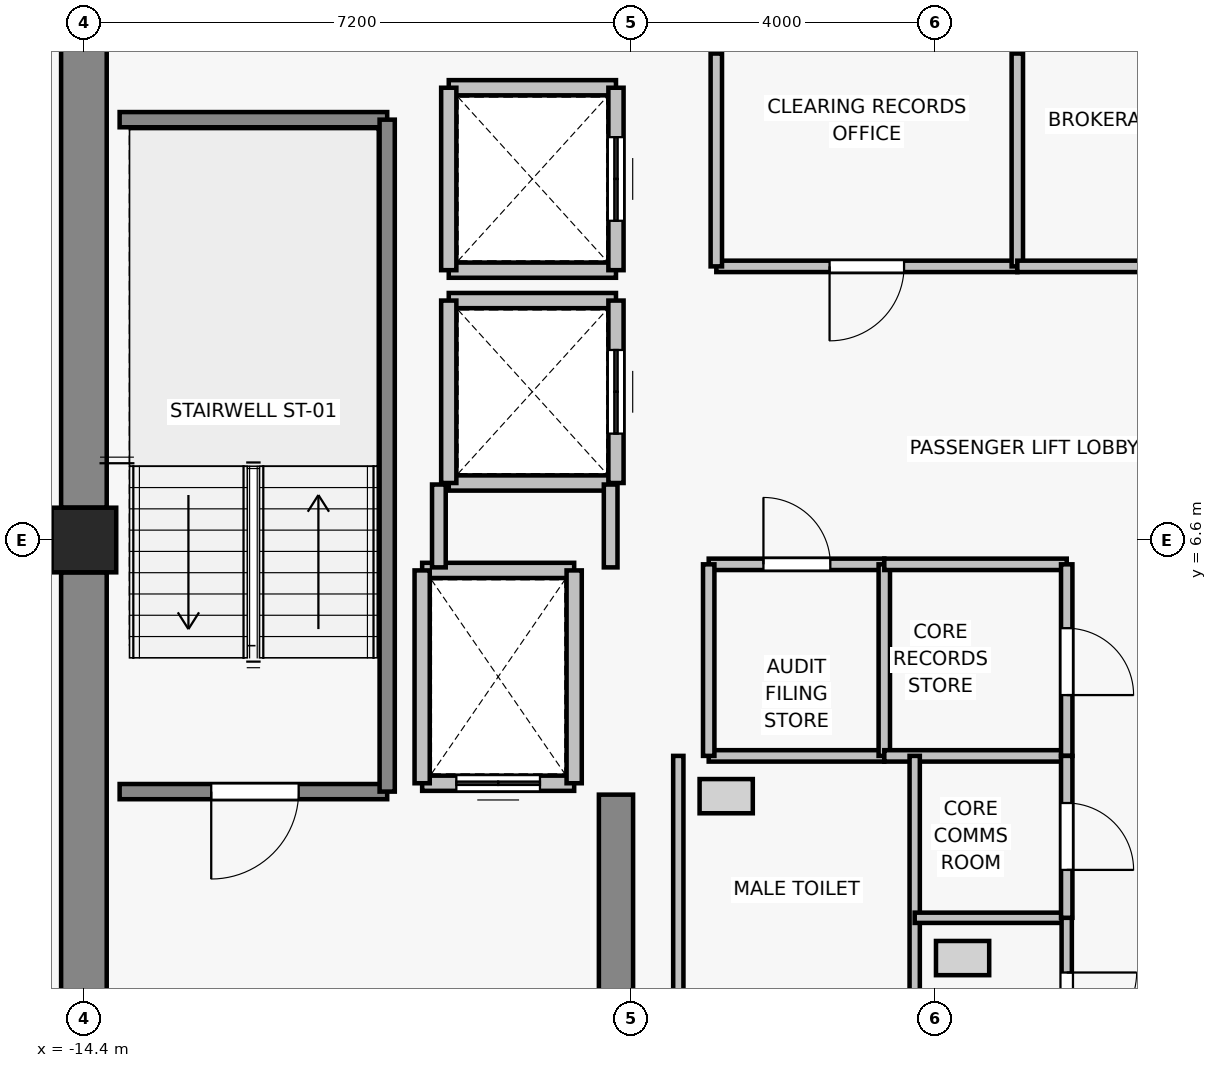
"""IFC4 building model, lengths in metres.
Left out: names, types, materials, properties, quantities, classifications, styles, units other than length and angle.
Written with IfcOpenShell. Run it as: python <this file> out.ifc"""

import sys

from ifc_helpers import new_model, si_unit, direction, frame, frame_2d, origin, origin_2d, place, context, subcontext, project, spatial, rectangle, extrude, source, transform, mapped, element, fill, save


model = new_model("IFC4")
c1 = context("Model", 3, precision=1e-05, world=origin(), true_north=direction((0.0, 1.0)))
c2 = subcontext(c1, "Body", "Model", "MODEL_VIEW")
j1 = project(units=[si_unit("LENGTHUNIT", "METRE"), si_unit("PLANEANGLEUNIT", "RADIAN")], contexts=[c1])
p1 = place(None, origin())
s1 = spatial("IfcSite", under=j1, at=p1, CompositionType="ELEMENT")
p2 = place(p1, origin())
s2 = spatial("IfcBuilding", under=s1, at=p2, CompositionType="ELEMENT")
p3 = place(p2, frame((0.0, 0.0, 261.7)))
s3 = spatial("IfcBuildingStorey", under=s2, at=p3, CompositionType="ELEMENT", Elevation=261.7)
p4 = place(p3, frame((-14.4, 6.6, 0.0), z_axis=(0.0, 0.0, 1.0), x_axis=(1.0, 0.0, 0.0)))
e1 = element("IfcColumn", 1, at=p4, inside=s3, PredefinedType="COLUMN", context=c2, shape_type="SweptSolid", body=[
    extrude(rectangle(XDim=0.85, YDim=0.85, at=origin_2d()), origin(), (0.0, 0.0, 1.0), 3.3),
])
p5 = place(p3, frame((-14.4, -0.775, 0.0), z_axis=(0.0, 0.0, 1.0), x_axis=(0.0, 1.0, 0.0)))
e2 = element("IfcWall", 2, at=p5, inside=s3, PredefinedType="SHEAR", context=c2, shape_type="SweptSolid", body=[
    extrude(rectangle(XDim=6.95, YDim=0.6, at=frame_2d((3.475, 0.0))), origin(), (0.0, 0.0, 1.0), 3.075),
])
p6 = place(p3, frame((-14.4, 7.025, 0.0), z_axis=(0.0, 0.0, 1.0), x_axis=(0.0, 1.0, 0.0)))
e3 = element("IfcWall", 3, at=p6, inside=s3, PredefinedType="SHEAR", context=c2, shape_type="SweptSolid", body=[
    extrude(rectangle(XDim=6.05, YDim=0.6, at=frame_2d((3.025, 0.0))), origin(), (0.0, 0.0, 1.0), 3.075),
])
p7 = place(p3, frame((-7.4, -0.9, 0.0), z_axis=(0.0, 0.0, 1.0), x_axis=(0.0, 1.0, 0.0)))
e4 = element("IfcWall", 4, at=p7, inside=s3, PredefinedType="SHEAR", context=c2, shape_type="SweptSolid", body=[
    extrude(rectangle(XDim=4.15, YDim=0.45, at=frame_2d((2.075, 0.0))), origin(), (0.0, 0.0, 1.0), 3.075),
])
p8 = place(p3, frame((-7.95, 3.4, 0.0), z_axis=(0.0, 0.0, 1.0), x_axis=(-1.0, 0.0, 0.0)))
e5 = element("IfcWall", 5, at=p8, inside=s3, PredefinedType="SOLIDWALL", context=c2, shape_type="SweptSolid", body=[
    extrude(rectangle(XDim=2.0, YDim=0.2, at=frame_2d((1.0, 0.0))), origin(), (0.0, 0.0, 1.0), 3.075),
])
p9 = place(p8, frame((0.45, 0.0, 0.0)))
e6 = element("IfcOpeningElement", 6, at=p9, cuts=e5, PredefinedType="OPENING", context=c2, shape_type="SweptSolid", body=[
    extrude(rectangle(XDim=1.1, YDim=2.2, at=frame_2d((0.55, 1.1))), frame((0.0, 0.11, 0.0), z_axis=(0.0, -1.0, 0.0), x_axis=(1.0, 0.0, 0.0)), (0.0, 0.0, 1.0), 0.22),
])
p10 = place(p3, frame((-9.95, 6.2, 0.0), z_axis=(0.0, 0.0, 1.0), x_axis=(1.0, 0.0, 0.0)))
e7 = element("IfcWall", 7, at=p10, inside=s3, PredefinedType="SOLIDWALL", context=c2, shape_type="SweptSolid", body=[
    extrude(rectangle(XDim=2.0, YDim=0.2, at=frame_2d((1.0, 0.0))), origin(), (0.0, 0.0, 1.0), 3.075),
])
for number, where, z_axis, x_axis in (
    (8, (-9.95, 3.4, 0.0), (0.0, 0.0, 1.0), (0.0, 1.0, 0.0)),
    (9, (-7.95, 6.2, 0.0), (0.0, 0.0, 1.0), (0.0, -1.0, 0.0)),
):
    element("IfcWall", number, at=place(p3, frame(where, z_axis=z_axis, x_axis=x_axis)), inside=s3, PredefinedType="SOLIDWALL", context=c2, shape_type="SweptSolid", body=[
        extrude(rectangle(XDim=2.8, YDim=0.2, at=frame_2d((1.4, 0.0))), origin(), (0.0, 0.0, 1.0), 3.075),
    ])
for number, where, z_axis, x_axis in (
    (10, (-7.4, 7.35, 0.0), (0.0, 0.0, 1.0), (-1.0, 0.0, 0.0)),
    (11, (-9.6, 9.75, 0.0), (0.0, 0.0, 1.0), (1.0, 0.0, 0.0)),
):
    element("IfcWall", number, at=place(p3, frame(where, z_axis=z_axis, x_axis=x_axis)), inside=s3, PredefinedType="SOLIDWALL", context=c2, shape_type="SweptSolid", body=[
        extrude(rectangle(XDim=2.2, YDim=0.2, at=frame_2d((1.1, 0.0))), origin(), (0.0, 0.0, 1.0), 2.615),
    ])
p11 = place(p3, frame((-9.6, 7.35, 0.0), z_axis=(0.0, 0.0, 1.0), x_axis=(0.0, 1.0, 0.0)))
e12 = element("IfcWall", 12, at=p11, inside=s3, PredefinedType="SOLIDWALL", context=c2, shape_type="SweptSolid", body=[
    extrude(rectangle(XDim=2.4, YDim=0.2, at=frame_2d((1.2, 0.0))), origin(), (0.0, 0.0, 1.0), 3.075),
])
p12 = place(p3, frame((-7.4, 9.75, 0.0), z_axis=(0.0, 0.0, 1.0), x_axis=(0.0, -1.0, 0.0)))
e13 = element("IfcWall", 13, at=p12, inside=s3, PredefinedType="SOLIDWALL", context=c2, shape_type="SweptSolid", body=[
    extrude(rectangle(XDim=2.4, YDim=0.2, at=frame_2d((1.2, 0.0))), origin(), (0.0, 0.0, 1.0), 2.615),
])
p13 = place(p12, frame((0.65, 0.0, 0.0)))
e14 = element("IfcOpeningElement", 14, at=p13, cuts=e13, PredefinedType="OPENING", context=c2, shape_type="SweptSolid", body=[
    extrude(rectangle(XDim=1.1, YDim=2.2, at=frame_2d((0.55, 1.1))), frame((0.0, 0.11, 0.0), z_axis=(0.0, -1.0, 0.0), x_axis=(1.0, 0.0, 0.0)), (0.0, 0.0, 1.0), 0.22),
])
for number, where, z_axis, x_axis in (
    (15, (-7.4, 10.15, 0.0), (0.0, 0.0, 1.0), (-1.0, 0.0, 0.0)),
    (16, (-9.6, 12.55, 0.0), (0.0, 0.0, 1.0), (1.0, 0.0, 0.0)),
):
    element("IfcWall", number, at=place(p3, frame(where, z_axis=z_axis, x_axis=x_axis)), inside=s3, PredefinedType="SOLIDWALL", context=c2, shape_type="SweptSolid", body=[
        extrude(rectangle(XDim=2.2, YDim=0.2, at=frame_2d((1.1, 0.0))), origin(), (0.0, 0.0, 1.0), 2.615),
    ])
p14 = place(p3, frame((-9.6, 10.15, 0.0), z_axis=(0.0, 0.0, 1.0), x_axis=(0.0, 1.0, 0.0)))
e17 = element("IfcWall", 17, at=p14, inside=s3, PredefinedType="SOLIDWALL", context=c2, shape_type="SweptSolid", body=[
    extrude(rectangle(XDim=2.4, YDim=0.2, at=frame_2d((1.2, 0.0))), origin(), (0.0, 0.0, 1.0), 3.075),
])
p15 = place(p3, frame((-7.4, 12.55, 0.0), z_axis=(0.0, 0.0, 1.0), x_axis=(0.0, -1.0, 0.0)))
e18 = element("IfcWall", 18, at=p15, inside=s3, PredefinedType="SOLIDWALL", context=c2, shape_type="SweptSolid", body=[
    extrude(rectangle(XDim=2.4, YDim=0.2, at=frame_2d((1.2, 0.0))), origin(), (0.0, 0.0, 1.0), 2.615),
])
p16 = place(p15, frame((0.65, 0.0, 0.0)))
e19 = element("IfcOpeningElement", 19, at=p16, cuts=e18, PredefinedType="OPENING", context=c2, shape_type="SweptSolid", body=[
    extrude(rectangle(XDim=1.1, YDim=2.2, at=frame_2d((0.55, 1.1))), frame((0.0, 0.11, 0.0), z_axis=(0.0, -1.0, 0.0), x_axis=(1.0, 0.0, 0.0)), (0.0, 0.0, 1.0), 0.22),
])
p17 = place(p3, frame((-10.41, 3.29, 0.0), z_axis=(0.0, 0.0, 1.0), x_axis=(-1.0, 0.0, 0.0)))
e20 = element("IfcWall", 20, at=p17, inside=s3, PredefinedType="SOLIDWALL", context=c2, shape_type="SweptSolid", body=[
    extrude(rectangle(XDim=3.52, YDim=0.2, at=frame_2d((1.76, 0.0))), origin(), (0.0, 0.0, 1.0), 3.075),
])
p18 = place(p17, frame((1.165, 0.0, 0.0)))
e21 = element("IfcOpeningElement", 21, at=p18, cuts=e20, PredefinedType="OPENING", context=c2, shape_type="SweptSolid", body=[
    extrude(rectangle(XDim=1.15, YDim=2.15, at=frame_2d((0.575, 1.075))), frame((0.0, 0.11, 0.0), z_axis=(0.0, -1.0, 0.0), x_axis=(1.0, 0.0, 0.0)), (0.0, 0.0, 1.0), 0.22),
])
p19 = place(p3, frame((-13.93, 12.13, 0.0), z_axis=(0.0, 0.0, 1.0), x_axis=(1.0, 0.0, 0.0)))
e22 = element("IfcWall", 22, at=p19, inside=s3, PredefinedType="SOLIDWALL", context=c2, shape_type="SweptSolid", body=[
    extrude(rectangle(XDim=3.52, YDim=0.2, at=frame_2d((1.76, 0.0))), origin(), (0.0, 0.0, 1.0), 3.075),
])
p20 = place(p3, frame((-10.41, 12.13, 0.0), z_axis=(0.0, 0.0, 1.0), x_axis=(0.0, -1.0, 0.0)))
e23 = element("IfcWall", 23, at=p20, inside=s3, PredefinedType="SOLIDWALL", context=c2, shape_type="SweptSolid", body=[
    extrude(rectangle(XDim=8.84, YDim=0.2, at=frame_2d((4.42, 0.0))), origin(), (0.0, 0.0, 1.0), 3.075),
])
p21 = place(p3, frame((-9.73, 6.24, 0.0), z_axis=(0.0, 0.0, 1.0), x_axis=(0.0, 1.0, 0.0)))
e24 = element("IfcWall", 24, at=p21, inside=s3, PredefinedType="PARTITIONING", context=c2, shape_type="SweptSolid", body=[
    extrude(rectangle(XDim=1.09, YDim=0.18, at=frame_2d((0.545, 0.0))), origin(), (0.0, 0.0, 1.0), 3.075),
])
p22 = place(p3, frame((-7.47, 7.33, 0.0), z_axis=(0.0, 0.0, 1.0), x_axis=(0.0, -1.0, 0.0)))
e25 = element("IfcWall", 25, at=p22, inside=s3, PredefinedType="PARTITIONING", context=c2, shape_type="SweptSolid", body=[
    extrude(rectangle(XDim=1.09, YDim=0.18, at=frame_2d((0.545, 0.0))), origin(), (0.0, 0.0, 1.0), 2.615),
])
p23 = place(p3, frame((-2.12, 10.2, 0.0), z_axis=(0.0, 0.0, 1.0), x_axis=(-1.0, 0.0, 0.0)))
e26 = element("IfcWall", 26, at=p23, inside=s3, PredefinedType="PARTITIONING", context=c2, shape_type="SweptSolid", body=[
    extrude(rectangle(XDim=3.96, YDim=0.15, at=frame_2d((1.98, 0.0))), origin(), (0.0, 0.0, 1.0), 3.075),
])
p24 = place(p23, frame((1.49, 0.0, 0.0)))
e27 = element("IfcOpeningElement", 27, at=p24, cuts=e26, PredefinedType="OPENING", context=c2, shape_type="SweptSolid", body=[
    extrude(rectangle(XDim=0.98, YDim=2.15, at=frame_2d((0.49, 1.075))), frame((0.0, 0.085, 0.0), z_axis=(0.0, -1.0, 0.0), x_axis=(1.0, 0.0, 0.0)), (0.0, 0.0, 1.0), 0.17),
])
for number, where, z_axis, x_axis in (
    (28, (-6.08, 10.2, 0.0), (0.0, 0.0, 1.0), (0.0, 1.0, 0.0)),
    (29, (-2.12, 13.0, 0.0), (0.0, 0.0, 1.0), (0.0, -1.0, 0.0)),
):
    element("IfcWall", number, at=place(p3, frame(where, z_axis=z_axis, x_axis=x_axis)), inside=s3, PredefinedType="PARTITIONING", context=c2, shape_type="SweptSolid", body=[
        extrude(rectangle(XDim=2.8, YDim=0.15, at=frame_2d((1.4, 0.0))), origin(), (0.0, 0.0, 1.0), 3.075),
    ])
p25 = place(p3, frame((2.04, 10.2, 0.0), z_axis=(0.0, 0.0, 1.0), x_axis=(-1.0, 0.0, 0.0)))
e30 = element("IfcWall", 30, at=p25, inside=s3, PredefinedType="PARTITIONING", context=c2, shape_type="SweptSolid", body=[
    extrude(rectangle(XDim=4.16, YDim=0.15, at=frame_2d((2.08, 0.0))), origin(), (0.0, 0.0, 1.0), 3.075),
])
p26 = place(p25, frame((1.55, 0.0, 0.0)))
e31 = element("IfcOpeningElement", 31, at=p26, cuts=e30, PredefinedType="OPENING", context=c2, shape_type="SweptSolid", body=[
    extrude(rectangle(XDim=0.98, YDim=2.15, at=frame_2d((0.49, 1.075))), frame((0.0, 0.085, 0.0), z_axis=(0.0, -1.0, 0.0), x_axis=(1.0, 0.0, 0.0)), (0.0, 0.0, 1.0), 0.17),
])
p27 = place(p3, frame((-3.87, 3.76, 0.0), z_axis=(0.0, 0.0, 1.0), x_axis=(-1.0, 0.0, 0.0)))
e32 = element("IfcWall", 32, at=p27, inside=s3, PredefinedType="PARTITIONING", context=c2, shape_type="SweptSolid", body=[
    extrude(rectangle(XDim=2.31, YDim=0.15, at=frame_2d((1.155, 0.0))), origin(), (0.0, 0.0, 1.0), 3.075),
])
p28 = place(p3, frame((-6.18, 6.28, 0.0), z_axis=(0.0, 0.0, 1.0), x_axis=(1.0, 0.0, 0.0)))
e33 = element("IfcWall", 33, at=p28, inside=s3, PredefinedType="PARTITIONING", context=c2, shape_type="SweptSolid", body=[
    extrude(rectangle(XDim=2.31, YDim=0.15, at=frame_2d((1.155, 0.0))), origin(), (0.0, 0.0, 1.0), 3.075),
])
p29 = place(p28, frame((0.72, 0.0, 0.0)))
e34 = element("IfcOpeningElement", 34, at=p29, cuts=e33, PredefinedType="OPENING", context=c2, shape_type="SweptSolid", body=[
    extrude(rectangle(XDim=0.88, YDim=2.1, at=frame_2d((0.44, 1.05))), frame((0.0, 0.085, 0.0), z_axis=(0.0, -1.0, 0.0), x_axis=(1.0, 0.0, 0.0)), (0.0, 0.0, 1.0), 0.17),
])
for number, where, z_axis, x_axis in (
    (35, (-6.18, 3.76, 0.0), (0.0, 0.0, 1.0), (0.0, 1.0, 0.0)),
    (36, (-3.87, 6.28, 0.0), (0.0, 0.0, 1.0), (0.0, -1.0, 0.0)),
):
    element("IfcWall", number, at=place(p3, frame(where, z_axis=z_axis, x_axis=x_axis)), inside=s3, PredefinedType="PARTITIONING", context=c2, shape_type="SweptSolid", body=[
        extrude(rectangle(XDim=2.52, YDim=0.15, at=frame_2d((1.26, 0.0))), origin(), (0.0, 0.0, 1.0), 3.075),
    ])
for number, where, z_axis, x_axis in (
    (37, (-1.47, 3.76, 0.0), (0.0, 0.0, 1.0), (-1.0, 0.0, 0.0)),
    (38, (-3.87, 6.28, 0.0), (0.0, 0.0, 1.0), (1.0, 0.0, 0.0)),
):
    element("IfcWall", number, at=place(p3, frame(where, z_axis=z_axis, x_axis=x_axis)), inside=s3, PredefinedType="PARTITIONING", context=c2, shape_type="SweptSolid", body=[
        extrude(rectangle(XDim=2.4, YDim=0.15, at=frame_2d((1.2, 0.0))), origin(), (0.0, 0.0, 1.0), 3.075),
    ])
p30 = place(p3, frame((-1.47, 6.28, 0.0), z_axis=(0.0, 0.0, 1.0), x_axis=(0.0, -1.0, 0.0)))
e39 = element("IfcWall", 39, at=p30, inside=s3, PredefinedType="PARTITIONING", context=c2, shape_type="SweptSolid", body=[
    extrude(rectangle(XDim=2.52, YDim=0.15, at=frame_2d((1.26, 0.0))), origin(), (0.0, 0.0, 1.0), 3.075),
])
p31 = place(p30, frame((0.84, 0.0, 0.0)))
e40 = element("IfcOpeningElement", 40, at=p31, cuts=e39, PredefinedType="OPENING", context=c2, shape_type="SweptSolid", body=[
    extrude(rectangle(XDim=0.88, YDim=2.1, at=frame_2d((0.44, 1.05))), frame((0.0, 0.085, 0.0), z_axis=(0.0, -1.0, 0.0), x_axis=(1.0, 0.0, 0.0)), (0.0, 0.0, 1.0), 0.17),
])
for number, where, z_axis, x_axis in (
    (41, (-6.58, -0.73, 0.0), (0.0, 0.0, 1.0), (0.0, 1.0, 0.0)),
    (42, (-3.47, 3.76, 0.0), (0.0, 0.0, 1.0), (0.0, -1.0, 0.0)),
):
    element("IfcWall", number, at=place(p3, frame(where, z_axis=z_axis, x_axis=x_axis)), inside=s3, PredefinedType="PARTITIONING", context=c2, shape_type="SweptSolid", body=[
        extrude(rectangle(XDim=4.49, YDim=0.135, at=frame_2d((2.245, 0.0))), origin(), (0.0, 0.0, 1.0), 3.075),
    ])
p32 = place(p3, frame((-3.47, 1.63, 0.0), z_axis=(0.0, 0.0, 1.0), x_axis=(1.0, 0.0, 0.0)))
e43 = element("IfcWall", 43, at=p32, inside=s3, PredefinedType="PARTITIONING", context=c2, shape_type="SweptSolid", body=[
    extrude(rectangle(XDim=2.0, YDim=0.135, at=frame_2d((1.0, 0.0))), origin(), (0.0, 0.0, 1.0), 3.075),
])
p33 = place(p3, frame((-1.47, 1.63, 0.0), z_axis=(0.0, 0.0, 1.0), x_axis=(0.0, -1.0, 0.0)))
e44 = element("IfcWall", 44, at=p33, inside=s3, PredefinedType="PARTITIONING", context=c2, shape_type="SweptSolid", body=[
    extrude(rectangle(XDim=2.36, YDim=0.135, at=frame_2d((1.18, 0.0))), origin(), (0.0, 0.0, 1.0), 3.075),
])
p34 = place(p33, frame((0.72, 0.0, 0.0)))
e45 = element("IfcOpeningElement", 45, at=p34, cuts=e44, PredefinedType="OPENING", context=c2, shape_type="SweptSolid", body=[
    extrude(rectangle(XDim=0.92, YDim=2.1, at=frame_2d((0.46, 1.05))), frame((0.0, 0.077, 0.0), z_axis=(0.0, -1.0, 0.0), x_axis=(1.0, 0.0, 0.0)), (0.0, 0.0, 1.0), 0.155),
])
p35 = place(p3, frame((-1.47, 3.76, 0.0), z_axis=(0.0, 0.0, 1.0), x_axis=(0.0, -1.0, 0.0)))
e46 = element("IfcWall", 46, at=p35, inside=s3, PredefinedType="PARTITIONING", context=c2, shape_type="SweptSolid", body=[
    extrude(rectangle(XDim=2.13, YDim=0.15, at=frame_2d((1.065, 0.0))), origin(), (0.0, 0.0, 1.0), 3.075),
])
p36 = place(p35, frame((0.62, 0.0, 0.0)))
e47 = element("IfcOpeningElement", 47, at=p36, cuts=e46, PredefinedType="OPENING", context=c2, shape_type="SweptSolid", body=[
    extrude(rectangle(XDim=0.88, YDim=2.1, at=frame_2d((0.44, 1.05))), frame((0.0, 0.085, 0.0), z_axis=(0.0, -1.0, 0.0), x_axis=(1.0, 0.0, 0.0)), (0.0, 0.0, 1.0), 0.17),
])
m1 = source(origin(), c2, "Body", "SweptSolid", [
    extrude(rectangle(XDim=1.1, YDim=2.2, at=frame_2d((0.55, 1.1))), frame((0.0, 0.025, 0.0), z_axis=(0.0, -1.0, 0.0), x_axis=(1.0, 0.0, 0.0)), (0.0, 0.0, 1.0), 0.05),
])
p37 = place(p9, origin())
e48 = element("IfcDoor", 48, at=p37, inside=s3, OperationType="DOUBLE_DOOR_SLIDING", PredefinedType="DOOR", context=c2, shape_type="MappedRepresentation", body=[
    mapped(m1, transform((0.0, 0.0, 0.0), x_axis=(1.0, 0.0, 0.0), y_axis=(0.0, 1.0, 0.0), z_axis=(0.0, 0.0, 1.0), scale=1.0)),
])
fill(e6, e48)
p38 = place(p13, origin())
e49 = element("IfcDoor", 49, at=p38, inside=s3, OperationType="DOUBLE_DOOR_SLIDING", PredefinedType="DOOR", context=c2, shape_type="MappedRepresentation", body=[
    mapped(m1, transform((0.0, 0.0, 0.0), x_axis=(1.0, 0.0, 0.0), y_axis=(0.0, 1.0, 0.0), z_axis=(0.0, 0.0, 1.0), scale=1.0)),
])
fill(e14, e49)
p39 = place(p16, origin())
e50 = element("IfcDoor", 50, at=p39, inside=s3, OperationType="DOUBLE_DOOR_SLIDING", PredefinedType="DOOR", context=c2, shape_type="MappedRepresentation", body=[
    mapped(m1, transform((0.0, 0.0, 0.0), x_axis=(1.0, 0.0, 0.0), y_axis=(0.0, 1.0, 0.0), z_axis=(0.0, 0.0, 1.0), scale=1.0)),
])
fill(e19, e50)
m2 = source(origin(), c2, "Body", "SweptSolid", [
    extrude(rectangle(XDim=1.15, YDim=2.15, at=frame_2d((0.575, 1.075))), frame((0.0, 0.025, 0.0), z_axis=(0.0, -1.0, 0.0), x_axis=(1.0, 0.0, 0.0)), (0.0, 0.0, 1.0), 0.05),
])
p40 = place(p18, origin())
e51 = element("IfcDoor", 51, at=p40, inside=s3, OperationType="SINGLE_SWING_RIGHT", PredefinedType="DOOR", context=c2, shape_type="MappedRepresentation", body=[
    mapped(m2, transform((0.0, 0.0, 0.0), x_axis=(1.0, 0.0, 0.0), y_axis=(0.0, 1.0, 0.0), z_axis=(0.0, 0.0, 1.0), scale=1.0)),
])
fill(e21, e51)
m3 = source(origin(), c2, "Body", "SweptSolid", [
    extrude(rectangle(XDim=0.98, YDim=2.15, at=frame_2d((0.49, 1.075))), frame((0.0, 0.025, 0.0), z_axis=(0.0, -1.0, 0.0), x_axis=(1.0, 0.0, 0.0)), (0.0, 0.0, 1.0), 0.05),
])
p41 = place(p24, origin())
e52 = element("IfcDoor", 52, at=p41, inside=s3, OperationType="SINGLE_SWING_RIGHT", PredefinedType="DOOR", context=c2, shape_type="MappedRepresentation", body=[
    mapped(m3, transform((0.0, 0.0, 0.0), x_axis=(1.0, 0.0, 0.0), y_axis=(0.0, 1.0, 0.0), z_axis=(0.0, 0.0, 1.0), scale=1.0)),
])
fill(e27, e52)
m4 = source(origin(), c2, "Body", "SweptSolid", [
    extrude(rectangle(XDim=0.88, YDim=2.1, at=frame_2d((0.44, 1.05))), frame((0.0, 0.025, 0.0), z_axis=(0.0, -1.0, 0.0), x_axis=(1.0, 0.0, 0.0)), (0.0, 0.0, 1.0), 0.05),
])
p42 = place(p29, origin())
e53 = element("IfcDoor", 53, at=p42, inside=s3, OperationType="SINGLE_SWING_LEFT", PredefinedType="DOOR", context=c2, shape_type="MappedRepresentation", body=[
    mapped(m4, transform((0.0, 0.0, 0.0), x_axis=(1.0, 0.0, 0.0), y_axis=(0.0, 1.0, 0.0), z_axis=(0.0, 0.0, 1.0), scale=1.0)),
])
fill(e34, e53)
p43 = place(p31, origin())
e54 = element("IfcDoor", 54, at=p43, inside=s3, OperationType="SINGLE_SWING_RIGHT", PredefinedType="DOOR", context=c2, shape_type="MappedRepresentation", body=[
    mapped(m4, transform((0.0, 0.0, 0.0), x_axis=(1.0, 0.0, 0.0), y_axis=(0.0, 1.0, 0.0), z_axis=(0.0, 0.0, 1.0), scale=1.0)),
])
fill(e40, e54)
m5 = source(origin(), c2, "Body", "SweptSolid", [
    extrude(rectangle(XDim=0.92, YDim=2.1, at=frame_2d((0.46, 1.05))), frame((0.0, 0.025, 0.0), z_axis=(0.0, -1.0, 0.0), x_axis=(1.0, 0.0, 0.0)), (0.0, 0.0, 1.0), 0.05),
])
p44 = place(p34, origin())
e55 = element("IfcDoor", 55, at=p44, inside=s3, OperationType="SINGLE_SWING_LEFT", PredefinedType="DOOR", context=c2, shape_type="MappedRepresentation", body=[
    mapped(m5, transform((0.0, 0.0, 0.0), x_axis=(1.0, 0.0, 0.0), y_axis=(0.0, 1.0, 0.0), z_axis=(0.0, 0.0, 1.0), scale=1.0)),
])
fill(e45, e55)
p45 = place(p36, origin())
e56 = element("IfcDoor", 56, at=p45, inside=s3, OperationType="SINGLE_SWING_RIGHT", PredefinedType="DOOR", context=c2, shape_type="MappedRepresentation", body=[
    mapped(m4, transform((0.0, 0.0, 0.0), x_axis=(1.0, 0.0, 0.0), y_axis=(0.0, 1.0, 0.0), z_axis=(0.0, 0.0, 1.0), scale=1.0)),
])
fill(e47, e56)
save(model, sys.argv[1])
